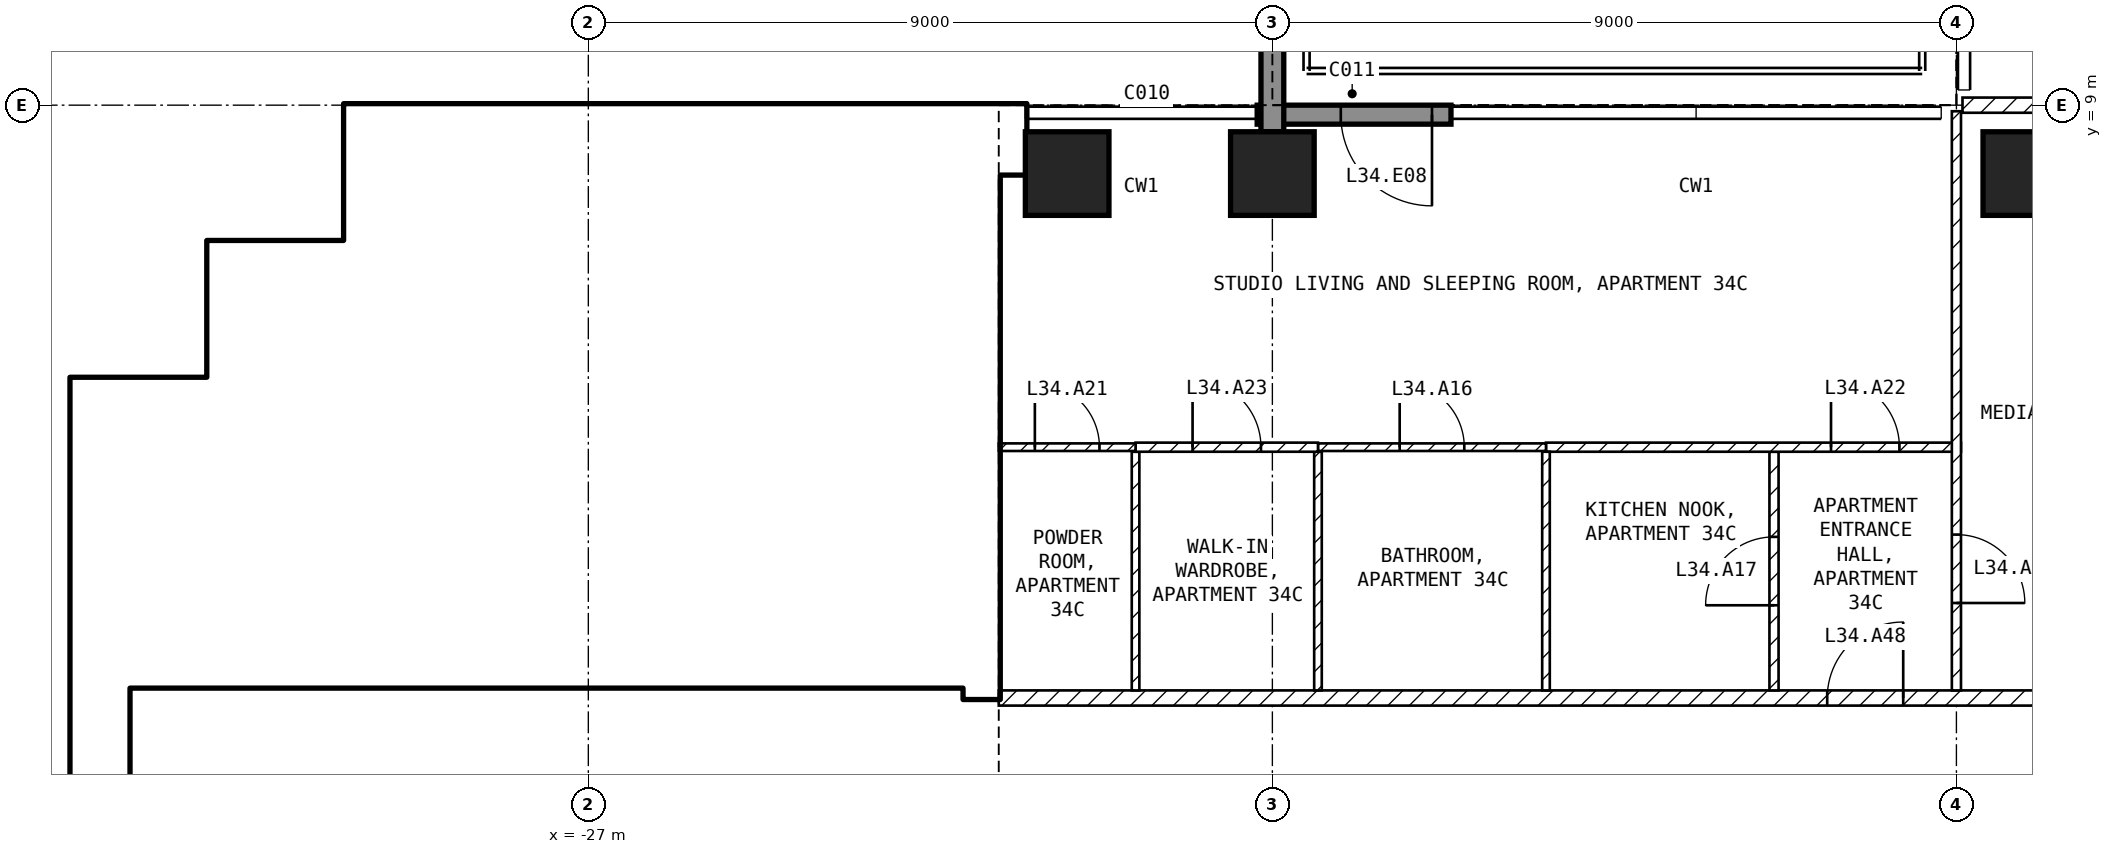
"""IFC4 building model, lengths in metres.
Left out: names, types, materials, properties, quantities, classifications, styles, units other than length and angle.
Written with IfcOpenShell. Run it as: python <this file> out.ifc"""

import sys

from ifc_helpers import new_model, si_unit, direction, frame, frame_2d, origin, origin_2d, place, context, subcontext, project, spatial, rectangle, extrude, element, fill, save


model = new_model("IFC4")
c1 = context("Model", 3, precision=1e-05, world=origin(), true_north=direction((0.0, 1.0)))
c2 = subcontext(c1, "Body", "Model", "MODEL_VIEW")
j1 = project(units=[si_unit("LENGTHUNIT", "METRE"), si_unit("PLANEANGLEUNIT", "RADIAN")], contexts=[c1])
p1 = place(None, origin())
s1 = spatial("IfcSite", under=j1, at=p1, CompositionType="ELEMENT")
p2 = place(p1, origin())
s2 = spatial("IfcBuilding", under=s1, at=p2, CompositionType="ELEMENT")
p3 = place(p2, frame((0.0, 0.0, 140.9)))
s3 = spatial("IfcBuildingStorey", under=s2, at=p3, CompositionType="ELEMENT", Elevation=140.9)
for number, where, z_axis, x_axis in (
    (1, (-20.7, 8.1, -0.25), (0.0, 0.0, 1.0), (1.0, 0.0, 0.0)),
    (2, (-18.0, 8.1, -0.25), (0.0, 0.0, 1.0), (1.0, 0.0, 0.0)),
    (3, (-8.1, 8.1, -0.25), (0.0, 0.0, 1.0), (1.0, 0.0, 0.0)),
):
    element("IfcColumn", number, at=place(p3, frame(where, z_axis=z_axis, x_axis=x_axis)), inside=s3, PredefinedType="COLUMN", context=c2, shape_type="SweptSolid", body=[
        extrude(rectangle(XDim=1.1, YDim=1.1, at=origin_2d()), origin(), (0.0, 0.0, 1.0), 3.5),
    ])
p4 = place(p3, frame((-15.65, 8.875, 0.0), z_axis=(0.0, 0.0, 1.0), x_axis=(-1.0, 0.0, 0.0)))
e4 = element("IfcWall", 4, at=p4, inside=s3, PredefinedType="SOLIDWALL", context=c2, shape_type="SweptSolid", body=[
    extrude(rectangle(XDim=2.55, YDim=0.25, at=frame_2d((1.275, 0.0))), origin(), (0.0, 0.0, 1.0), 3.25),
])
p5 = place(p4, frame((0.25, 0.0, 0.0)))
e5 = element("IfcOpeningElement", 5, at=p5, cuts=e4, PredefinedType="OPENING", context=c2, shape_type="SweptSolid", body=[
    extrude(rectangle(XDim=1.2, YDim=2.4, at=frame_2d((0.6, 1.2))), frame((0.0, 0.135, 0.0), z_axis=(0.0, -1.0, 0.0), x_axis=(1.0, 0.0, 0.0)), (0.0, 0.0, 1.0), 0.27),
])
p6 = place(p3, frame((-18.0, 8.65, 0.0), z_axis=(0.0, 0.0, 1.0), x_axis=(0.0, 1.0, 0.0)))
e6 = element("IfcWall", 6, at=p6, inside=s3, PredefinedType="SOLIDWALL", context=c2, shape_type="SweptSolid", body=[
    extrude(rectangle(XDim=3.09, YDim=0.3, at=frame_2d((1.545, 0.0))), origin(), (0.0, 0.0, 1.0), 3.25),
])
p7 = place(p3, frame((-33.425, -4.65, 0.0), z_axis=(0.0, 0.0, 1.0), x_axis=(0.0, 1.0, 0.0)))
e7 = element("IfcWall", 7, at=p7, inside=s3, PredefinedType="SHEAR", context=c2, shape_type="SweptSolid", body=[
    extrude(rectangle(XDim=10.05, YDim=0.75, at=frame_2d((5.025, 0.0))), origin(), (0.0, 0.0, 1.0), 3.25),
])
for number, where, z_axis, x_axis in (
    (8, (-33.05, 5.025, 0.0), (0.0, 0.0, 1.0), (1.0, 0.0, 0.0)),
    (9, (-31.625, 5.4, 0.0), (0.0, 0.0, 1.0), (0.0, 1.0, 0.0)),
    (10, (-31.25, 6.825, 0.0), (0.0, 0.0, 1.0), (1.0, 0.0, 0.0)),
    (11, (-29.825, 7.2, 0.0), (0.0, 0.0, 1.0), (0.0, 1.0, 0.0)),
):
    element("IfcWall", number, at=place(p3, frame(where, z_axis=z_axis, x_axis=x_axis)), inside=s3, PredefinedType="SHEAR", context=c2, shape_type="SweptSolid", body=[
        extrude(rectangle(XDim=1.8, YDim=0.75, at=frame_2d((0.9, 0.0))), origin(), (0.0, 0.0, 1.0), 3.25),
    ])
p8 = place(p3, frame((-29.45, 8.55, 0.0), z_axis=(0.0, 0.0, 1.0), x_axis=(1.0, 0.0, 0.0)))
e12 = element("IfcWall", 12, at=p8, inside=s3, PredefinedType="SHEAR", context=c2, shape_type="SweptSolid", body=[
    extrude(rectangle(XDim=8.2, YDim=0.9, at=frame_2d((4.1, 0.0))), origin(), (0.0, 0.0, 1.0), 3.25),
])
p9 = place(p3, frame((-21.825, 1.2, 0.0), z_axis=(0.0, 0.0, 1.0), x_axis=(0.0, 1.0, 0.0)))
e13 = element("IfcWall", 13, at=p9, inside=s3, PredefinedType="SHEAR", context=c2, shape_type="SweptSolid", body=[
    extrude(rectangle(XDim=6.9, YDim=0.45, at=frame_2d((3.45, 0.0))), origin(), (0.0, 0.0, 1.0), 3.25),
])
p10 = place(p3, frame((-33.05, 1.45, 0.0), z_axis=(0.0, 0.0, 1.0), x_axis=(1.0, 0.0, 0.0)))
e14 = element("IfcWall", 14, at=p10, inside=s3, PredefinedType="SOLIDWALL", context=c2, shape_type="SweptSolid", body=[
    extrude(rectangle(XDim=11.0, YDim=0.2, at=frame_2d((5.5, 0.0))), origin(), (0.0, 0.0, 1.0), 3.25),
])
p11 = place(p10, frame((9.25, 0.0, 0.0)))
e15 = element("IfcOpeningElement", 15, at=p11, cuts=e14, PredefinedType="OPENING", context=c2, shape_type="SweptSolid", body=[
    extrude(rectangle(XDim=1.0, YDim=2.1, at=frame_2d((0.5, 1.05))), frame((0.0, 0.11, 0.0), z_axis=(0.0, -1.0, 0.0), x_axis=(1.0, 0.0, 0.0)), (0.0, 0.0, 1.0), 0.22),
])
p12 = place(p10, frame((6.75, 0.0, 0.0)))
e16 = element("IfcOpeningElement", 16, at=p12, cuts=e14, PredefinedType="OPENING", context=c2, shape_type="SweptSolid", body=[
    extrude(rectangle(XDim=1.0, YDim=2.1, at=frame_2d((0.5, 1.05))), frame((0.0, 0.11, 0.0), z_axis=(0.0, -1.0, 0.0), x_axis=(1.0, 0.0, 0.0)), (0.0, 0.0, 1.0), 0.22),
])
p13 = place(p10, frame((1.025, 0.0, 0.0)))
e17 = element("IfcOpeningElement", 17, at=p13, cuts=e14, PredefinedType="OPENING", context=c2, shape_type="SweptSolid", body=[
    extrude(rectangle(XDim=0.9, YDim=2.1, at=frame_2d((0.45, 1.05))), frame((0.0, 0.11, 0.0), z_axis=(0.0, -1.0, 0.0), x_axis=(1.0, 0.0, 0.0)), (0.0, 0.0, 1.0), 0.22),
])
p14 = place(p3, frame((-28.35, 5.15, 0.0), z_axis=(0.0, 0.0, 1.0), x_axis=(1.0, 0.0, 0.0)))
e18 = element("IfcWall", 18, at=p14, inside=s3, PredefinedType="SOLIDWALL", context=c2, shape_type="SweptSolid", body=[
    extrude(rectangle(XDim=6.3, YDim=0.2, at=frame_2d((3.15, 0.0))), origin(), (0.0, 0.0, 1.0), 3.25),
])
p15 = place(p14, frame((5.1, 0.0, 0.0)))
e19 = element("IfcOpeningElement", 19, at=p15, cuts=e18, PredefinedType="OPENING", context=c2, shape_type="SweptSolid", body=[
    extrude(rectangle(XDim=1.0, YDim=2.1, at=frame_2d((0.5, 1.05))), frame((0.0, 0.11, 0.0), z_axis=(0.0, -1.0, 0.0), x_axis=(1.0, 0.0, 0.0)), (0.0, 0.0, 1.0), 0.22),
])
p16 = place(p3, frame((-28.25, 5.25, 0.0), z_axis=(0.0, 0.0, 1.0), x_axis=(0.0, 1.0, 0.0)))
e20 = element("IfcWall", 20, at=p16, inside=s3, PredefinedType="SOLIDWALL", context=c2, shape_type="SweptSolid", body=[
    extrude(rectangle(XDim=2.85, YDim=0.2, at=frame_2d((1.425, 0.0))), origin(), (0.0, 0.0, 1.0), 3.25),
])
p17 = place(p3, frame((-33.05, 3.95, 0.0), z_axis=(0.0, 0.0, 1.0), x_axis=(1.0, 0.0, 0.0)))
e21 = element("IfcWall", 21, at=p17, inside=s3, PredefinedType="SOLIDWALL", context=c2, shape_type="SweptSolid", body=[
    extrude(rectangle(XDim=5.85, YDim=0.2, at=frame_2d((2.925, 0.0))), origin(), (0.0, 0.0, 1.0), 3.25),
])
p18 = place(p3, frame((-27.1, 1.55, 0.0), z_axis=(0.0, 0.0, 1.0), x_axis=(0.0, 1.0, 0.0)))
e22 = element("IfcWall", 22, at=p18, inside=s3, PredefinedType="SOLIDWALL", context=c2, shape_type="SweptSolid", body=[
    extrude(rectangle(XDim=3.5, YDim=0.2, at=frame_2d((1.75, 0.0))), origin(), (0.0, 0.0, 1.0), 3.25),
])
p19 = place(p18, frame((0.6, 0.0, 0.0)))
e23 = element("IfcOpeningElement", 23, at=p19, cuts=e22, PredefinedType="OPENING", context=c2, shape_type="SweptSolid", body=[
    extrude(rectangle(XDim=1.1, YDim=2.1, at=frame_2d((0.55, 1.05))), frame((0.0, 0.11, 0.0), z_axis=(0.0, -1.0, 0.0), x_axis=(1.0, 0.0, 0.0)), (0.0, 0.0, 1.0), 0.22),
])
p20 = place(p18, frame((2.6, 0.0, 0.0)))
e24 = element("IfcOpeningElement", 24, at=p20, cuts=e22, PredefinedType="OPENING", context=c2, shape_type="SweptSolid", body=[
    extrude(rectangle(XDim=0.8, YDim=2.1, at=frame_2d((0.4, 1.05))), frame((0.0, 0.11, 0.0), z_axis=(0.0, -1.0, 0.0), x_axis=(1.0, 0.0, 0.0)), (0.0, 0.0, 1.0), 0.22),
])
p21 = place(p3, frame((-30.0, 1.55, 0.0), z_axis=(0.0, 0.0, 1.0), x_axis=(0.0, 1.0, 0.0)))
e25 = element("IfcWall", 25, at=p21, inside=s3, PredefinedType="SOLIDWALL", context=c2, shape_type="SweptSolid", body=[
    extrude(rectangle(XDim=2.3, YDim=0.2, at=frame_2d((1.15, 0.0))), origin(), (0.0, 0.0, 1.0), 3.25),
])
p22 = place(p3, frame((-21.6, 1.2, 0.0), z_axis=(0.0, 0.0, 1.0), x_axis=(1.0, 0.0, 0.0)))
e26 = element("IfcWall", 26, at=p22, inside=s3, PredefinedType="PARTITIONING", context=c2, shape_type="SweptSolid", body=[
    extrude(rectangle(XDim=17.2, YDim=0.2, at=frame_2d((8.6, 0.0))), origin(), (0.0, 0.0, 1.0), 3.25),
])
p23 = place(p22, frame((10.9, 0.0, 0.0)))
e27 = element("IfcOpeningElement", 27, at=p23, cuts=e26, PredefinedType="OPENING", context=c2, shape_type="SweptSolid", body=[
    extrude(rectangle(XDim=1.0, YDim=2.1, at=frame_2d((0.5, 1.05))), frame((0.0, 0.11, 0.0), z_axis=(0.0, -1.0, 0.0), x_axis=(1.0, 0.0, 0.0)), (0.0, 0.0, 1.0), 0.22),
])
p24 = place(p3, frame((-8.92, 9.0, 0.0), z_axis=(0.0, 0.0, 1.0), x_axis=(1.0, 0.0, 0.0)))
e28 = element("IfcWall", 28, at=p24, inside=s3, PredefinedType="PARTITIONING", context=c2, shape_type="SweptSolid", body=[
    extrude(rectangle(XDim=17.84, YDim=0.2, at=frame_2d((8.92, 0.0))), origin(), (0.0, 0.0, 1.0), 3.25),
])
p25 = place(p24, frame((8.42, 0.0, 0.0)))
e29 = element("IfcOpeningElement", 29, at=p25, cuts=e28, PredefinedType="OPENING", context=c2, shape_type="SweptSolid", body=[
    extrude(rectangle(XDim=1.0, YDim=2.1, at=frame_2d((0.5, 1.05))), frame((0.0, 0.11, 0.0), z_axis=(0.0, -1.0, 0.0), x_axis=(1.0, 0.0, 0.0)), (0.0, 0.0, 1.0), 0.22),
])
p26 = place(p3, frame((-11.4, 1.3, 0.0), z_axis=(0.0, 0.0, 1.0), x_axis=(0.0, 1.0, 0.0)))
e30 = element("IfcWall", 30, at=p26, inside=s3, PredefinedType="PARTITIONING", context=c2, shape_type="SweptSolid", body=[
    extrude(rectangle(XDim=3.14, YDim=0.12, at=frame_2d((1.57, 0.0))), origin(), (0.0, 0.0, 1.0), 3.25),
])
p27 = place(p26, frame((1.12, 0.0, 0.0)))
e31 = element("IfcOpeningElement", 31, at=p27, cuts=e30, PredefinedType="OPENING", context=c2, shape_type="SweptSolid", body=[
    extrude(rectangle(XDim=0.9, YDim=2.1, at=frame_2d((0.45, 1.05))), frame((0.0, 0.07, 0.0), z_axis=(0.0, -1.0, 0.0), x_axis=(1.0, 0.0, 0.0)), (0.0, 0.0, 1.0), 0.14),
])
p28 = place(p3, frame((-14.4, 4.5, 0.0), z_axis=(0.0, 0.0, 1.0), x_axis=(1.0, 0.0, 0.0)))
e32 = element("IfcWall", 32, at=p28, inside=s3, PredefinedType="PARTITIONING", context=c2, shape_type="SweptSolid", body=[
    extrude(rectangle(XDim=5.46, YDim=0.12, at=frame_2d((2.73, 0.0))), origin(), (0.0, 0.0, 1.0), 3.25),
])
p29 = place(p28, frame((3.75, 0.0, 0.0)))
e33 = element("IfcOpeningElement", 33, at=p29, cuts=e32, PredefinedType="OPENING", context=c2, shape_type="SweptSolid", body=[
    extrude(rectangle(XDim=0.9, YDim=2.1, at=frame_2d((0.45, 1.05))), frame((0.0, 0.07, 0.0), z_axis=(0.0, -1.0, 0.0), x_axis=(1.0, 0.0, 0.0)), (0.0, 0.0, 1.0), 0.14),
])
p30 = place(p3, frame((-9.0, 8.92, 0.0), z_axis=(0.0, 0.0, 1.0), x_axis=(0.0, -1.0, 0.0)))
e34 = element("IfcWall", 34, at=p30, inside=s3, PredefinedType="PARTITIONING", context=c2, shape_type="SweptSolid", body=[
    extrude(rectangle(XDim=7.62, YDim=0.12, at=frame_2d((3.81, 0.0))), origin(), (0.0, 0.0, 1.0), 3.25),
])
p31 = place(p30, frame((5.57, 0.0, 0.0)))
e35 = element("IfcOpeningElement", 35, at=p31, cuts=e34, PredefinedType="OPENING", context=c2, shape_type="SweptSolid", body=[
    extrude(rectangle(XDim=0.9, YDim=2.1, at=frame_2d((0.45, 1.05))), frame((0.0, 0.07, 0.0), z_axis=(0.0, -1.0, 0.0), x_axis=(1.0, 0.0, 0.0)), (0.0, 0.0, 1.0), 0.14),
])
for number, where, z_axis, x_axis in (
    (36, (-14.4, 1.3, 0.0), (0.0, 0.0, 1.0), (0.0, 1.0, 0.0)),
    (37, (-17.4, 1.3, 0.0), (0.0, 0.0, 1.0), (0.0, 1.0, 0.0)),
):
    element("IfcWall", number, at=place(p3, frame(where, z_axis=z_axis, x_axis=x_axis)), inside=s3, PredefinedType="PARTITIONING", context=c2, shape_type="SweptSolid", body=[
        extrude(rectangle(XDim=3.14, YDim=0.1, at=frame_2d((1.57, 0.0))), origin(), (0.0, 0.0, 1.0), 3.25),
    ])
p32 = place(p3, frame((-17.4, 4.5, 0.0), z_axis=(0.0, 0.0, 1.0), x_axis=(1.0, 0.0, 0.0)))
e38 = element("IfcWall", 38, at=p32, inside=s3, PredefinedType="PARTITIONING", context=c2, shape_type="SweptSolid", body=[
    extrude(rectangle(XDim=3.0, YDim=0.1, at=frame_2d((1.5, 0.0))), origin(), (0.0, 0.0, 1.0), 3.25),
])
p33 = place(p32, frame((1.075, 0.0, 0.0)))
e39 = element("IfcOpeningElement", 39, at=p33, cuts=e38, PredefinedType="OPENING", context=c2, shape_type="SweptSolid", body=[
    extrude(rectangle(XDim=0.85, YDim=2.1, at=frame_2d((0.425, 1.05))), frame((0.0, 0.06, 0.0), z_axis=(0.0, -1.0, 0.0), x_axis=(1.0, 0.0, 0.0)), (0.0, 0.0, 1.0), 0.12),
])
p34 = place(p3, frame((-19.8, 1.3, 0.0), z_axis=(0.0, 0.0, 1.0), x_axis=(0.0, 1.0, 0.0)))
e40 = element("IfcWall", 40, at=p34, inside=s3, PredefinedType="PARTITIONING", context=c2, shape_type="SweptSolid", body=[
    extrude(rectangle(XDim=3.14, YDim=0.1, at=frame_2d((1.57, 0.0))), origin(), (0.0, 0.0, 1.0), 3.25),
])
p35 = place(p3, frame((-19.8, 4.5, 0.0), z_axis=(0.0, 0.0, 1.0), x_axis=(1.0, 0.0, 0.0)))
e41 = element("IfcWall", 41, at=p35, inside=s3, PredefinedType="PARTITIONING", context=c2, shape_type="SweptSolid", body=[
    extrude(rectangle(XDim=2.4, YDim=0.12, at=frame_2d((1.2, 0.0))), origin(), (0.0, 0.0, 1.0), 3.25),
])
p36 = place(p35, frame((0.75, 0.0, 0.0)))
e42 = element("IfcOpeningElement", 42, at=p36, cuts=e41, PredefinedType="OPENING", context=c2, shape_type="SweptSolid", body=[
    extrude(rectangle(XDim=0.9, YDim=2.1, at=frame_2d((0.45, 1.05))), frame((0.0, 0.07, 0.0), z_axis=(0.0, -1.0, 0.0), x_axis=(1.0, 0.0, 0.0)), (0.0, 0.0, 1.0), 0.14),
])
p37 = place(p3, frame((-21.6, 4.5, 0.0), z_axis=(0.0, 0.0, 1.0), x_axis=(1.0, 0.0, 0.0)))
e43 = element("IfcWall", 43, at=p37, inside=s3, PredefinedType="PARTITIONING", context=c2, shape_type="SweptSolid", body=[
    extrude(rectangle(XDim=1.8, YDim=0.1, at=frame_2d((0.9, 0.0))), origin(), (0.0, 0.0, 1.0), 3.25),
])
p38 = place(p37, frame((0.475, 0.0, 0.0)))
e44 = element("IfcOpeningElement", 44, at=p38, cuts=e43, PredefinedType="OPENING", context=c2, shape_type="SweptSolid", body=[
    extrude(rectangle(XDim=0.85, YDim=2.1, at=frame_2d((0.425, 1.05))), frame((0.0, 0.06, 0.0), z_axis=(0.0, -1.0, 0.0), x_axis=(1.0, 0.0, 0.0)), (0.0, 0.0, 1.0), 0.12),
])
p39 = place(p5, origin())
e45 = element("IfcDoor", 45, at=p39, inside=s3, OperationType="SINGLE_SWING_LEFT", PredefinedType="DOOR", context=c2, shape_type="SweptSolid", body=[
    extrude(rectangle(XDim=1.2, YDim=2.4, at=frame_2d((0.6, 1.2))), frame((0.0, 0.025, 0.0), z_axis=(0.0, -1.0, 0.0), x_axis=(1.0, 0.0, 0.0)), (0.0, 0.0, 1.0), 0.05),
])
fill(e5, e45)
p40 = place(p19, origin())
e46 = element("IfcDoor", 46, at=p40, inside=s3, OperationType="DOUBLE_DOOR_SLIDING", PredefinedType="DOOR", context=c2, shape_type="SweptSolid", body=[
    extrude(rectangle(XDim=1.1, YDim=2.1, at=frame_2d((0.55, 1.05))), frame((0.0, 0.025, 0.0), z_axis=(0.0, -1.0, 0.0), x_axis=(1.0, 0.0, 0.0)), (0.0, 0.0, 1.0), 0.05),
])
fill(e23, e46)
p41 = place(p15, origin())
e47 = element("IfcDoor", 47, at=p41, inside=s3, OperationType="SINGLE_SWING_LEFT", PredefinedType="DOOR", context=c2, shape_type="SweptSolid", body=[
    extrude(rectangle(XDim=1.0, YDim=2.1, at=frame_2d((0.5, 1.05))), frame((0.0, 0.025, 0.0), z_axis=(0.0, -1.0, 0.0), x_axis=(1.0, 0.0, 0.0)), (0.0, 0.0, 1.0), 0.05),
])
fill(e19, e47)
p42 = place(p11, origin())
e48 = element("IfcDoor", 48, at=p42, inside=s3, OperationType="SINGLE_SWING_LEFT", PredefinedType="DOOR", context=c2, shape_type="SweptSolid", body=[
    extrude(rectangle(XDim=1.0, YDim=2.1, at=frame_2d((0.5, 1.05))), frame((0.0, 0.025, 0.0), z_axis=(0.0, -1.0, 0.0), x_axis=(1.0, 0.0, 0.0)), (0.0, 0.0, 1.0), 0.05),
])
fill(e15, e48)
p43 = place(p12, origin())
e49 = element("IfcDoor", 49, at=p43, inside=s3, OperationType="SINGLE_SWING_LEFT", PredefinedType="DOOR", context=c2, shape_type="SweptSolid", body=[
    extrude(rectangle(XDim=1.0, YDim=2.1, at=frame_2d((0.5, 1.05))), frame((0.0, 0.025, 0.0), z_axis=(0.0, -1.0, 0.0), x_axis=(1.0, 0.0, 0.0)), (0.0, 0.0, 1.0), 0.05),
])
fill(e16, e49)
p44 = place(p20, origin())
e50 = element("IfcDoor", 50, at=p44, inside=s3, OperationType="SINGLE_SWING_LEFT", PredefinedType="DOOR", context=c2, shape_type="SweptSolid", body=[
    extrude(rectangle(XDim=0.8, YDim=2.1, at=frame_2d((0.4, 1.05))), frame((0.0, 0.025, 0.0), z_axis=(0.0, -1.0, 0.0), x_axis=(1.0, 0.0, 0.0)), (0.0, 0.0, 1.0), 0.05),
])
fill(e24, e50)
p45 = place(p13, origin())
e51 = element("IfcDoor", 51, at=p45, inside=s3, OperationType="SINGLE_SWING_LEFT", PredefinedType="DOOR", context=c2, shape_type="SweptSolid", body=[
    extrude(rectangle(XDim=0.9, YDim=2.1, at=frame_2d((0.45, 1.05))), frame((0.0, 0.025, 0.0), z_axis=(0.0, -1.0, 0.0), x_axis=(1.0, 0.0, 0.0)), (0.0, 0.0, 1.0), 0.05),
])
fill(e17, e51)
p46 = place(p33, origin())
e52 = element("IfcDoor", 52, at=p46, inside=s3, OperationType="SINGLE_SWING_LEFT", PredefinedType="DOOR", context=c2, shape_type="SweptSolid", body=[
    extrude(rectangle(XDim=0.85, YDim=2.1, at=frame_2d((0.425, 1.05))), frame((0.0, 0.025, 0.0), z_axis=(0.0, -1.0, 0.0), x_axis=(1.0, 0.0, 0.0)), (0.0, 0.0, 1.0), 0.05),
])
fill(e39, e52)
p47 = place(p27, origin())
e53 = element("IfcDoor", 53, at=p47, inside=s3, OperationType="SINGLE_SWING_LEFT", PredefinedType="DOOR", context=c2, shape_type="SweptSolid", body=[
    extrude(rectangle(XDim=0.9, YDim=2.1, at=frame_2d((0.45, 1.05))), frame((0.0, 0.025, 0.0), z_axis=(0.0, -1.0, 0.0), x_axis=(1.0, 0.0, 0.0)), (0.0, 0.0, 1.0), 0.05),
])
fill(e31, e53)
p48 = place(p31, origin())
e54 = element("IfcDoor", 54, at=p48, inside=s3, OperationType="SINGLE_SWING_RIGHT", PredefinedType="DOOR", context=c2, shape_type="SweptSolid", body=[
    extrude(rectangle(XDim=0.9, YDim=2.1, at=frame_2d((0.45, 1.05))), frame((0.0, 0.025, 0.0), z_axis=(0.0, -1.0, 0.0), x_axis=(1.0, 0.0, 0.0)), (0.0, 0.0, 1.0), 0.05),
])
fill(e35, e54)
p49 = place(p38, origin())
e55 = element("IfcDoor", 55, at=p49, inside=s3, OperationType="SINGLE_SWING_LEFT", PredefinedType="DOOR", context=c2, shape_type="SweptSolid", body=[
    extrude(rectangle(XDim=0.85, YDim=2.1, at=frame_2d((0.425, 1.05))), frame((0.0, 0.025, 0.0), z_axis=(0.0, -1.0, 0.0), x_axis=(1.0, 0.0, 0.0)), (0.0, 0.0, 1.0), 0.05),
])
fill(e44, e55)
p50 = place(p29, origin())
e56 = element("IfcDoor", 56, at=p50, inside=s3, OperationType="SINGLE_SWING_LEFT", PredefinedType="DOOR", context=c2, shape_type="SweptSolid", body=[
    extrude(rectangle(XDim=0.9, YDim=2.1, at=frame_2d((0.45, 1.05))), frame((0.0, 0.025, 0.0), z_axis=(0.0, -1.0, 0.0), x_axis=(1.0, 0.0, 0.0)), (0.0, 0.0, 1.0), 0.05),
])
fill(e33, e56)
p51 = place(p36, origin())
e57 = element("IfcDoor", 57, at=p51, inside=s3, OperationType="SINGLE_SWING_LEFT", PredefinedType="DOOR", context=c2, shape_type="SweptSolid", body=[
    extrude(rectangle(XDim=0.9, YDim=2.1, at=frame_2d((0.45, 1.05))), frame((0.0, 0.025, 0.0), z_axis=(0.0, -1.0, 0.0), x_axis=(1.0, 0.0, 0.0)), (0.0, 0.0, 1.0), 0.05),
])
fill(e42, e57)
p52 = place(p23, origin())
e58 = element("IfcDoor", 58, at=p52, inside=s3, OperationType="SINGLE_SWING_RIGHT", PredefinedType="DOOR", context=c2, shape_type="SweptSolid", body=[
    extrude(rectangle(XDim=1.0, YDim=2.1, at=frame_2d((0.5, 1.05))), frame((0.0, 0.025, 0.0), z_axis=(0.0, -1.0, 0.0), x_axis=(1.0, 0.0, 0.0)), (0.0, 0.0, 1.0), 0.05),
])
fill(e27, e58)
save(model, sys.argv[1])
